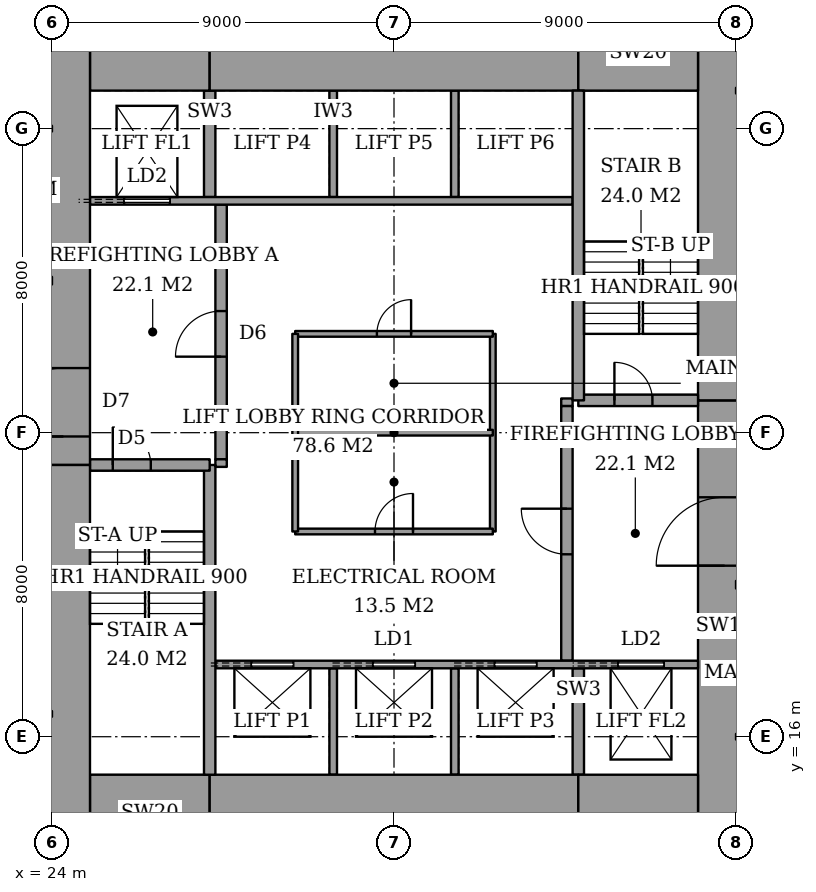
"""IFC4 building model, lengths in metres.
Left out: names, types, materials, properties, quantities, classifications, styles, units other than length and angle.
Written with IfcOpenShell. Run it as: python <this file> out.ifc"""

import sys

from ifc_helpers import new_model, si_unit, direction, frame, frame_2d, origin, place, context, subcontext, project, spatial, rectangle, extrude, element, fill, save


model = new_model("IFC4")
c1 = context("Model", 3, precision=1e-05, world=origin(), true_north=direction((0.0, 1.0)))
c2 = subcontext(c1, "Body", "Model", "MODEL_VIEW")
j1 = project(units=[si_unit("LENGTHUNIT", "METRE"), si_unit("PLANEANGLEUNIT", "RADIAN")], contexts=[c1])
p1 = place(None, origin())
s1 = spatial("IfcSite", under=j1, at=p1, CompositionType="ELEMENT")
p2 = place(p1, origin())
s2 = spatial("IfcBuilding", under=s1, at=p2, CompositionType="ELEMENT")
p3 = place(p2, frame((0.0, 0.0, 87.2)))
s3 = spatial("IfcBuildingStorey", under=s2, at=p3, CompositionType="ELEMENT", Elevation=87.2)
p4 = place(p3, frame((25.0, 14.0, 0.0), z_axis=(0.0, 0.0, 1.0), x_axis=(1.0, 0.0, 0.0)))
e1 = element("IfcWall", 1, at=p4, inside=s3, PredefinedType="SHEAR", context=c2, shape_type="SweptSolid", body=[
    extrude(rectangle(XDim=3.15, YDim=2.0, at=frame_2d((1.575, 0.0))), origin(), (0.0, 0.0, 1.0), 3.6),
])
p5 = place(p3, frame((28.15, 14.0, 0.0), z_axis=(0.0, 0.0, 1.0), x_axis=(1.0, 0.0, 0.0)))
e2 = element("IfcWall", 2, at=p5, inside=s3, PredefinedType="SHEAR", context=c2, shape_type="SweptSolid", body=[
    extrude(rectangle(XDim=9.7, YDim=2.0, at=frame_2d((4.85, 0.0))), origin(), (0.0, 0.0, 1.0), 3.6),
])
for number, where, z_axis, x_axis in (
    (3, (37.85, 14.0, 0.0), (0.0, 0.0, 1.0), (1.0, 0.0, 0.0)),
    (4, (25.0, 34.0, 0.0), (0.0, 0.0, 1.0), (1.0, 0.0, 0.0)),
):
    element("IfcWall", number, at=place(p3, frame(where, z_axis=z_axis, x_axis=x_axis)), inside=s3, PredefinedType="SHEAR", context=c2, shape_type="SweptSolid", body=[
        extrude(rectangle(XDim=3.15, YDim=2.0, at=frame_2d((1.575, 0.0))), origin(), (0.0, 0.0, 1.0), 3.6),
    ])
p6 = place(p3, frame((28.15, 34.0, 0.0), z_axis=(0.0, 0.0, 1.0), x_axis=(1.0, 0.0, 0.0)))
e5 = element("IfcWall", 5, at=p6, inside=s3, PredefinedType="SHEAR", context=c2, shape_type="SweptSolid", body=[
    extrude(rectangle(XDim=9.7, YDim=2.0, at=frame_2d((4.85, 0.0))), origin(), (0.0, 0.0, 1.0), 3.6),
])
p7 = place(p3, frame((37.85, 34.0, 0.0), z_axis=(0.0, 0.0, 1.0), x_axis=(1.0, 0.0, 0.0)))
e6 = element("IfcWall", 6, at=p7, inside=s3, PredefinedType="SHEAR", context=c2, shape_type="SweptSolid", body=[
    extrude(rectangle(XDim=3.15, YDim=2.0, at=frame_2d((1.575, 0.0))), origin(), (0.0, 0.0, 1.0), 3.6),
])
p8 = place(p3, frame((24.3, 13.0, 0.0), z_axis=(0.0, 0.0, 1.0), x_axis=(0.0, 1.0, 0.0)))
e7 = element("IfcWall", 7, at=p8, inside=s3, PredefinedType="SHEAR", context=c2, shape_type="SweptSolid", body=[
    extrude(rectangle(XDim=10.15, YDim=1.4, at=frame_2d((5.075, 0.0))), origin(), (0.0, 0.0, 1.0), 3.6),
])
p9 = place(p3, frame((24.3, 23.15, 0.0), z_axis=(0.0, 0.0, 1.0), x_axis=(0.0, 1.0, 0.0)))
e8 = element("IfcWall", 8, at=p9, inside=s3, PredefinedType="SHEAR", context=c2, shape_type="SweptSolid", body=[
    extrude(rectangle(XDim=11.85, YDim=1.4, at=frame_2d((5.925, 0.0))), origin(), (0.0, 0.0, 1.0), 3.6),
])
p10 = place(p9, frame((0.75, 0.0, 0.0)))
e9 = element("IfcOpeningElement", 9, at=p10, cuts=e8, PredefinedType="OPENING", context=c2, shape_type="SweptSolid", body=[
    extrude(rectangle(XDim=1.8, YDim=2.4, at=frame_2d((0.9, 1.2))), frame((0.0, 0.71, 0.0), z_axis=(0.0, -1.0, 0.0), x_axis=(1.0, 0.0, 0.0)), (0.0, 0.0, 1.0), 1.42),
])
p11 = place(p3, frame((41.7, 13.0, 0.0), z_axis=(0.0, 0.0, 1.0), x_axis=(0.0, 1.0, 0.0)))
e10 = element("IfcWall", 10, at=p11, inside=s3, PredefinedType="SHEAR", context=c2, shape_type="SweptSolid", body=[
    extrude(rectangle(XDim=11.85, YDim=1.4, at=frame_2d((5.925, 0.0))), origin(), (0.0, 0.0, 1.0), 3.6),
])
p12 = place(p11, frame((7.5, 0.0, 0.0)))
e11 = element("IfcOpeningElement", 11, at=p12, cuts=e10, PredefinedType="OPENING", context=c2, shape_type="SweptSolid", body=[
    extrude(rectangle(XDim=1.8, YDim=2.4, at=frame_2d((0.9, 1.2))), frame((0.0, 0.71, 0.0), z_axis=(0.0, -1.0, 0.0), x_axis=(1.0, 0.0, 0.0)), (0.0, 0.0, 1.0), 1.42),
])
p13 = place(p3, frame((41.7, 24.85, 0.0), z_axis=(0.0, 0.0, 1.0), x_axis=(0.0, 1.0, 0.0)))
e12 = element("IfcWall", 12, at=p13, inside=s3, PredefinedType="SHEAR", context=c2, shape_type="SweptSolid", body=[
    extrude(rectangle(XDim=10.15, YDim=1.4, at=frame_2d((5.075, 0.0))), origin(), (0.0, 0.0, 1.0), 3.6),
])
p14 = place(p3, frame((28.15, 15.0, 0.0), z_axis=(0.0, 0.0, 1.0), x_axis=(0.0, 1.0, 0.0)))
e13 = element("IfcWall", 13, at=p14, inside=s3, PredefinedType="SHEAR", context=c2, shape_type="SweptSolid", body=[
    extrude(rectangle(XDim=8.15, YDim=0.3, at=frame_2d((4.075, 0.0))), origin(), (0.0, 0.0, 1.0), 3.6),
])
p15 = place(p3, frame((25.0, 23.15, 0.0), z_axis=(0.0, 0.0, 1.0), x_axis=(1.0, 0.0, 0.0)))
e14 = element("IfcWall", 14, at=p15, inside=s3, PredefinedType="SHEAR", context=c2, shape_type="SweptSolid", body=[
    extrude(rectangle(XDim=3.15, YDim=0.3, at=frame_2d((1.575, 0.0))), origin(), (0.0, 0.0, 1.0), 3.6),
])
p16 = place(p15, frame((0.6, 0.0, 0.0)))
e15 = element("IfcOpeningElement", 15, at=p16, cuts=e14, PredefinedType="OPENING", context=c2, shape_type="SweptSolid", body=[
    extrude(rectangle(XDim=1.0, YDim=2.1, at=frame_2d((0.5, 1.05))), frame((0.0, 0.16, 0.0), z_axis=(0.0, -1.0, 0.0), x_axis=(1.0, 0.0, 0.0)), (0.0, 0.0, 1.0), 0.32),
])
p17 = place(p3, frame((37.85, 24.85, 0.0), z_axis=(0.0, 0.0, 1.0), x_axis=(0.0, 1.0, 0.0)))
e16 = element("IfcWall", 16, at=p17, inside=s3, PredefinedType="SHEAR", context=c2, shape_type="SweptSolid", body=[
    extrude(rectangle(XDim=8.15, YDim=0.3, at=frame_2d((4.075, 0.0))), origin(), (0.0, 0.0, 1.0), 3.6),
])
p18 = place(p3, frame((37.85, 24.85, 0.0), z_axis=(0.0, 0.0, 1.0), x_axis=(1.0, 0.0, 0.0)))
e17 = element("IfcWall", 17, at=p18, inside=s3, PredefinedType="SHEAR", context=c2, shape_type="SweptSolid", body=[
    extrude(rectangle(XDim=3.15, YDim=0.3, at=frame_2d((1.575, 0.0))), origin(), (0.0, 0.0, 1.0), 3.6),
])
p19 = place(p18, frame((0.95, 0.0, 0.0)))
e18 = element("IfcOpeningElement", 18, at=p19, cuts=e17, PredefinedType="OPENING", context=c2, shape_type="SweptSolid", body=[
    extrude(rectangle(XDim=1.0, YDim=2.1, at=frame_2d((0.5, 1.05))), frame((0.0, 0.16, 0.0), z_axis=(0.0, -1.0, 0.0), x_axis=(1.0, 0.0, 0.0)), (0.0, 0.0, 1.0), 0.32),
])
p20 = place(p3, frame((28.45, 23.3, 0.0), z_axis=(0.0, 0.0, 1.0), x_axis=(0.0, 1.0, 0.0)))
e19 = element("IfcWall", 19, at=p20, inside=s3, PredefinedType="PARTITIONING", context=c2, shape_type="SweptSolid", body=[
    extrude(rectangle(XDim=6.7, YDim=0.3, at=frame_2d((3.35, 0.0))), origin(), (0.0, 0.0, 1.0), 3.6),
])
p21 = place(p20, frame((2.7, 0.0, 0.0)))
e20 = element("IfcOpeningElement", 20, at=p21, cuts=e19, PredefinedType="OPENING", context=c2, shape_type="SweptSolid", body=[
    extrude(rectangle(XDim=1.2, YDim=2.1, at=frame_2d((0.6, 1.05))), frame((0.0, 0.16, 0.0), z_axis=(0.0, -1.0, 0.0), x_axis=(1.0, 0.0, 0.0)), (0.0, 0.0, 1.0), 0.32),
])
p22 = place(p3, frame((37.55, 18.0, 0.0), z_axis=(0.0, 0.0, 1.0), x_axis=(0.0, 1.0, 0.0)))
e21 = element("IfcWall", 21, at=p22, inside=s3, PredefinedType="PARTITIONING", context=c2, shape_type="SweptSolid", body=[
    extrude(rectangle(XDim=6.7, YDim=0.3, at=frame_2d((3.35, 0.0))), origin(), (0.0, 0.0, 1.0), 3.6),
])
p23 = place(p22, frame((2.8, 0.0, 0.0)))
e22 = element("IfcOpeningElement", 22, at=p23, cuts=e21, PredefinedType="OPENING", context=c2, shape_type="SweptSolid", body=[
    extrude(rectangle(XDim=1.2, YDim=2.1, at=frame_2d((0.6, 1.05))), frame((0.0, 0.16, 0.0), z_axis=(0.0, -1.0, 0.0), x_axis=(1.0, 0.0, 0.0)), (0.0, 0.0, 1.0), 0.32),
])
p24 = place(p3, frame((28.3, 17.9, 0.0), z_axis=(0.0, 0.0, 1.0), x_axis=(1.0, 0.0, 0.0)))
e23 = element("IfcWall", 23, at=p24, inside=s3, PredefinedType="PARTITIONING", context=c2, shape_type="SweptSolid", body=[
    extrude(rectangle(XDim=12.7, YDim=0.2, at=frame_2d((6.35, 0.0))), origin(), (0.0, 0.0, 1.0), 3.6),
])
p25 = place(p24, frame((0.95, 0.0, 0.0)))
e24 = element("IfcOpeningElement", 24, at=p25, cuts=e23, PredefinedType="OPENING", context=c2, shape_type="SweptSolid", body=[
    extrude(rectangle(XDim=1.1, YDim=2.1, at=frame_2d((0.55, 1.05))), frame((0.0, 0.11, 0.0), z_axis=(0.0, -1.0, 0.0), x_axis=(1.0, 0.0, 0.0)), (0.0, 0.0, 1.0), 0.22),
])
p26 = place(p24, frame((4.15, 0.0, 0.0)))
e25 = element("IfcOpeningElement", 25, at=p26, cuts=e23, PredefinedType="OPENING", context=c2, shape_type="SweptSolid", body=[
    extrude(rectangle(XDim=1.1, YDim=2.1, at=frame_2d((0.55, 1.05))), frame((0.0, 0.11, 0.0), z_axis=(0.0, -1.0, 0.0), x_axis=(1.0, 0.0, 0.0)), (0.0, 0.0, 1.0), 0.22),
])
p27 = place(p24, frame((7.35, 0.0, 0.0)))
e26 = element("IfcOpeningElement", 26, at=p27, cuts=e23, PredefinedType="OPENING", context=c2, shape_type="SweptSolid", body=[
    extrude(rectangle(XDim=1.1, YDim=2.1, at=frame_2d((0.55, 1.05))), frame((0.0, 0.11, 0.0), z_axis=(0.0, -1.0, 0.0), x_axis=(1.0, 0.0, 0.0)), (0.0, 0.0, 1.0), 0.22),
])
p28 = place(p24, frame((10.6, 0.0, 0.0)))
e27 = element("IfcOpeningElement", 27, at=p28, cuts=e23, PredefinedType="OPENING", context=c2, shape_type="SweptSolid", body=[
    extrude(rectangle(XDim=1.2, YDim=2.1, at=frame_2d((0.6, 1.05))), frame((0.0, 0.11, 0.0), z_axis=(0.0, -1.0, 0.0), x_axis=(1.0, 0.0, 0.0)), (0.0, 0.0, 1.0), 0.22),
])
p29 = place(p3, frame((25.0, 30.1, 0.0), z_axis=(0.0, 0.0, 1.0), x_axis=(1.0, 0.0, 0.0)))
e28 = element("IfcWall", 28, at=p29, inside=s3, PredefinedType="PARTITIONING", context=c2, shape_type="SweptSolid", body=[
    extrude(rectangle(XDim=12.7, YDim=0.2, at=frame_2d((6.35, 0.0))), origin(), (0.0, 0.0, 1.0), 3.6),
])
p30 = place(p29, frame((0.9, 0.0, 0.0)))
e29 = element("IfcOpeningElement", 29, at=p30, cuts=e28, PredefinedType="OPENING", context=c2, shape_type="SweptSolid", body=[
    extrude(rectangle(XDim=1.2, YDim=2.1, at=frame_2d((0.6, 1.05))), frame((0.0, 0.11, 0.0), z_axis=(0.0, -1.0, 0.0), x_axis=(1.0, 0.0, 0.0)), (0.0, 0.0, 1.0), 0.22),
])
for number, where, z_axis, x_axis in (
    (30, (31.4, 15.0, 0.0), (0.0, 0.0, 1.0), (0.0, 1.0, 0.0)),
    (31, (34.6, 15.0, 0.0), (0.0, 0.0, 1.0), (0.0, 1.0, 0.0)),
):
    element("IfcWall", number, at=place(p3, frame(where, z_axis=z_axis, x_axis=x_axis)), inside=s3, PredefinedType="PARTITIONING", context=c2, shape_type="SweptSolid", body=[
        extrude(rectangle(XDim=2.8, YDim=0.2, at=frame_2d((1.4, 0.0))), origin(), (0.0, 0.0, 1.0), 3.6),
    ])
p31 = place(p3, frame((37.85, 15.0, 0.0), z_axis=(0.0, 0.0, 1.0), x_axis=(0.0, 1.0, 0.0)))
e32 = element("IfcWall", 32, at=p31, inside=s3, PredefinedType="SHEAR", context=c2, shape_type="SweptSolid", body=[
    extrude(rectangle(XDim=2.8, YDim=0.3, at=frame_2d((1.4, 0.0))), origin(), (0.0, 0.0, 1.0), 3.6),
])
for number, where, z_axis, x_axis in (
    (33, (31.4, 30.2, 0.0), (0.0, 0.0, 1.0), (0.0, 1.0, 0.0)),
    (34, (34.6, 30.2, 0.0), (0.0, 0.0, 1.0), (0.0, 1.0, 0.0)),
):
    element("IfcWall", number, at=place(p3, frame(where, z_axis=z_axis, x_axis=x_axis)), inside=s3, PredefinedType="PARTITIONING", context=c2, shape_type="SweptSolid", body=[
        extrude(rectangle(XDim=2.8, YDim=0.2, at=frame_2d((1.4, 0.0))), origin(), (0.0, 0.0, 1.0), 3.6),
    ])
p32 = place(p3, frame((28.15, 30.2, 0.0), z_axis=(0.0, 0.0, 1.0), x_axis=(0.0, 1.0, 0.0)))
e35 = element("IfcWall", 35, at=p32, inside=s3, PredefinedType="SHEAR", context=c2, shape_type="SweptSolid", body=[
    extrude(rectangle(XDim=2.8, YDim=0.3, at=frame_2d((1.4, 0.0))), origin(), (0.0, 0.0, 1.0), 3.6),
])
for number, where, z_axis, x_axis in (
    (36, (28.3, 23.2, 0.0), (0.0, 0.0, 1.0), (1.0, 0.0, 0.0)),
    (37, (37.4, 24.8, 0.0), (0.0, 0.0, 1.0), (1.0, 0.0, 0.0)),
):
    element("IfcWall", number, at=place(p3, frame(where, z_axis=z_axis, x_axis=x_axis)), inside=s3, PredefinedType="PARTITIONING", context=c2, shape_type="SweptSolid", body=[
        extrude(rectangle(XDim=0.3, YDim=0.2, at=frame_2d((0.15, 0.0))), origin(), (0.0, 0.0, 1.0), 3.6),
    ])
p33 = place(p3, frame((30.4, 21.4, 0.0), z_axis=(0.0, 0.0, 1.0), x_axis=(1.0, 0.0, 0.0)))
e38 = element("IfcWall", 38, at=p33, inside=s3, PredefinedType="PARTITIONING", context=c2, shape_type="SweptSolid", body=[
    extrude(rectangle(XDim=5.2, YDim=0.15, at=frame_2d((2.6, 0.0))), origin(), (0.0, 0.0, 1.0), 3.25),
])
p34 = place(p33, frame((2.1, 0.0, 0.0)))
e39 = element("IfcOpeningElement", 39, at=p34, cuts=e38, PredefinedType="OPENING", context=c2, shape_type="SweptSolid", body=[
    extrude(rectangle(XDim=1.0, YDim=2.1, at=frame_2d((0.5, 1.05))), frame((0.0, 0.085, 0.0), z_axis=(0.0, -1.0, 0.0), x_axis=(1.0, 0.0, 0.0)), (0.0, 0.0, 1.0), 0.17),
])
p35 = place(p3, frame((30.4, 26.6, 0.0), z_axis=(0.0, 0.0, 1.0), x_axis=(1.0, 0.0, 0.0)))
e40 = element("IfcWall", 40, at=p35, inside=s3, PredefinedType="PARTITIONING", context=c2, shape_type="SweptSolid", body=[
    extrude(rectangle(XDim=5.2, YDim=0.15, at=frame_2d((2.6, 0.0))), origin(), (0.0, 0.0, 1.0), 3.25),
])
p36 = place(p35, frame((2.15, 0.0, 0.0)))
e41 = element("IfcOpeningElement", 41, at=p36, cuts=e40, PredefinedType="OPENING", context=c2, shape_type="SweptSolid", body=[
    extrude(rectangle(XDim=0.9, YDim=2.1, at=frame_2d((0.45, 1.05))), frame((0.0, 0.085, 0.0), z_axis=(0.0, -1.0, 0.0), x_axis=(1.0, 0.0, 0.0)), (0.0, 0.0, 1.0), 0.17),
])
for number, where, z_axis, x_axis in (
    (42, (30.4, 21.4, 0.0), (0.0, 0.0, 1.0), (0.0, 1.0, 0.0)),
    (43, (35.6, 21.4, 0.0), (0.0, 0.0, 1.0), (0.0, 1.0, 0.0)),
    (44, (30.4, 24.0, 0.0), (0.0, 0.0, 1.0), (1.0, 0.0, 0.0)),
):
    element("IfcWall", number, at=place(p3, frame(where, z_axis=z_axis, x_axis=x_axis)), inside=s3, PredefinedType="PARTITIONING", context=c2, shape_type="SweptSolid", body=[
        extrude(rectangle(XDim=5.2, YDim=0.15, at=frame_2d((2.6, 0.0))), origin(), (0.0, 0.0, 1.0), 3.25),
    ])
p37 = place(p16, origin())
e45 = element("IfcDoor", 45, at=p37, inside=s3, OperationType="SINGLE_SWING_RIGHT", PredefinedType="DOOR", context=c2, shape_type="SweptSolid", body=[
    extrude(rectangle(XDim=1.0, YDim=2.1, at=frame_2d((0.5, 1.05))), frame((0.0, 0.025, 0.0), z_axis=(0.0, -1.0, 0.0), x_axis=(1.0, 0.0, 0.0)), (0.0, 0.0, 1.0), 0.05),
])
fill(e15, e45)
p38 = place(p19, origin())
e46 = element("IfcDoor", 46, at=p38, inside=s3, OperationType="SINGLE_SWING_RIGHT", PredefinedType="DOOR", context=c2, shape_type="SweptSolid", body=[
    extrude(rectangle(XDim=1.0, YDim=2.1, at=frame_2d((0.5, 1.05))), frame((0.0, 0.025, 0.0), z_axis=(0.0, -1.0, 0.0), x_axis=(1.0, 0.0, 0.0)), (0.0, 0.0, 1.0), 0.05),
])
fill(e18, e46)
p39 = place(p21, origin())
e47 = element("IfcDoor", 47, at=p39, inside=s3, OperationType="SINGLE_SWING_RIGHT", PredefinedType="DOOR", context=c2, shape_type="SweptSolid", body=[
    extrude(rectangle(XDim=1.2, YDim=2.1, at=frame_2d((0.6, 1.05))), frame((0.0, 0.025, 0.0), z_axis=(0.0, -1.0, 0.0), x_axis=(1.0, 0.0, 0.0)), (0.0, 0.0, 1.0), 0.05),
])
fill(e20, e47)
p40 = place(p23, origin())
e48 = element("IfcDoor", 48, at=p40, inside=s3, OperationType="SINGLE_SWING_LEFT", PredefinedType="DOOR", context=c2, shape_type="SweptSolid", body=[
    extrude(rectangle(XDim=1.2, YDim=2.1, at=frame_2d((0.6, 1.05))), frame((0.0, 0.025, 0.0), z_axis=(0.0, -1.0, 0.0), x_axis=(1.0, 0.0, 0.0)), (0.0, 0.0, 1.0), 0.05),
])
fill(e22, e48)
p41 = place(p10, origin())
e49 = element("IfcDoor", 49, at=p41, inside=s3, OperationType="DOUBLE_DOOR_DOUBLE_SWING", PredefinedType="DOOR", context=c2, shape_type="SweptSolid", body=[
    extrude(rectangle(XDim=1.8, YDim=2.4, at=frame_2d((0.9, 1.2))), frame((0.0, 0.025, 0.0), z_axis=(0.0, -1.0, 0.0), x_axis=(1.0, 0.0, 0.0)), (0.0, 0.0, 1.0), 0.05),
])
fill(e9, e49)
p42 = place(p12, origin())
e50 = element("IfcDoor", 50, at=p42, inside=s3, OperationType="DOUBLE_DOOR_DOUBLE_SWING", PredefinedType="DOOR", context=c2, shape_type="SweptSolid", body=[
    extrude(rectangle(XDim=1.8, YDim=2.4, at=frame_2d((0.9, 1.2))), frame((0.0, 0.025, 0.0), z_axis=(0.0, -1.0, 0.0), x_axis=(1.0, 0.0, 0.0)), (0.0, 0.0, 1.0), 0.05),
])
fill(e11, e50)
p43 = place(p34, origin())
e51 = element("IfcDoor", 51, at=p43, inside=s3, OperationType="SINGLE_SWING_LEFT", PredefinedType="DOOR", context=c2, shape_type="SweptSolid", body=[
    extrude(rectangle(XDim=1.0, YDim=2.1, at=frame_2d((0.5, 1.05))), frame((0.0, 0.025, 0.0), z_axis=(0.0, -1.0, 0.0), x_axis=(1.0, 0.0, 0.0)), (0.0, 0.0, 1.0), 0.05),
])
fill(e39, e51)
p44 = place(p36, origin())
e52 = element("IfcDoor", 52, at=p44, inside=s3, OperationType="SINGLE_SWING_LEFT", PredefinedType="DOOR", context=c2, shape_type="SweptSolid", body=[
    extrude(rectangle(XDim=0.9, YDim=2.1, at=frame_2d((0.45, 1.05))), frame((0.0, 0.025, 0.0), z_axis=(0.0, -1.0, 0.0), x_axis=(1.0, 0.0, 0.0)), (0.0, 0.0, 1.0), 0.05),
])
fill(e41, e52)
p45 = place(p25, origin())
e53 = element("IfcDoor", 53, at=p45, inside=s3, OperationType="SLIDING_TO_LEFT", PredefinedType="DOOR", context=c2, shape_type="SweptSolid", body=[
    extrude(rectangle(XDim=1.1, YDim=2.1, at=frame_2d((0.55, 1.05))), frame((0.0, 0.025, 0.0), z_axis=(0.0, -1.0, 0.0), x_axis=(1.0, 0.0, 0.0)), (0.0, 0.0, 1.0), 0.05),
])
fill(e24, e53)
p46 = place(p26, origin())
e54 = element("IfcDoor", 54, at=p46, inside=s3, OperationType="SLIDING_TO_LEFT", PredefinedType="DOOR", context=c2, shape_type="SweptSolid", body=[
    extrude(rectangle(XDim=1.1, YDim=2.1, at=frame_2d((0.55, 1.05))), frame((0.0, 0.025, 0.0), z_axis=(0.0, -1.0, 0.0), x_axis=(1.0, 0.0, 0.0)), (0.0, 0.0, 1.0), 0.05),
])
fill(e25, e54)
p47 = place(p27, origin())
e55 = element("IfcDoor", 55, at=p47, inside=s3, OperationType="SLIDING_TO_LEFT", PredefinedType="DOOR", context=c2, shape_type="SweptSolid", body=[
    extrude(rectangle(XDim=1.1, YDim=2.1, at=frame_2d((0.55, 1.05))), frame((0.0, 0.025, 0.0), z_axis=(0.0, -1.0, 0.0), x_axis=(1.0, 0.0, 0.0)), (0.0, 0.0, 1.0), 0.05),
])
fill(e26, e55)
p48 = place(p30, origin())
e56 = element("IfcDoor", 56, at=p48, inside=s3, OperationType="SLIDING_TO_LEFT", PredefinedType="DOOR", context=c2, shape_type="SweptSolid", body=[
    extrude(rectangle(XDim=1.2, YDim=2.1, at=frame_2d((0.6, 1.05))), frame((0.0, 0.025, 0.0), z_axis=(0.0, -1.0, 0.0), x_axis=(1.0, 0.0, 0.0)), (0.0, 0.0, 1.0), 0.05),
])
fill(e29, e56)
p49 = place(p28, origin())
e57 = element("IfcDoor", 57, at=p49, inside=s3, OperationType="SLIDING_TO_LEFT", PredefinedType="DOOR", context=c2, shape_type="SweptSolid", body=[
    extrude(rectangle(XDim=1.2, YDim=2.1, at=frame_2d((0.6, 1.05))), frame((0.0, 0.025, 0.0), z_axis=(0.0, -1.0, 0.0), x_axis=(1.0, 0.0, 0.0)), (0.0, 0.0, 1.0), 0.05),
])
fill(e27, e57)
save(model, sys.argv[1])
